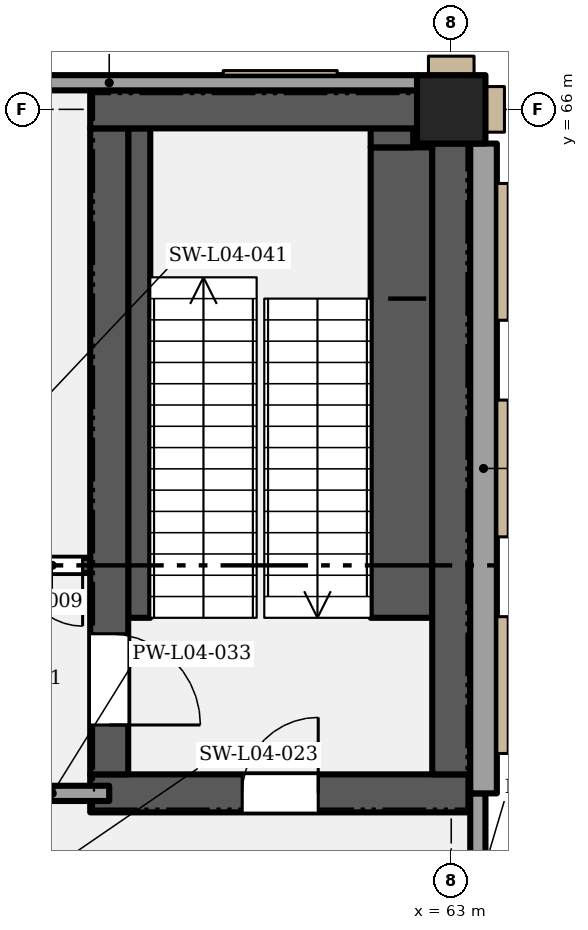
"""IFC4 building model, lengths in metres.
Left out: names, types, materials, properties, quantities, classifications, styles, units other than length and angle.
Written with IfcOpenShell. Run it as: python <this file> out.ifc"""

import sys

from ifc_helpers import new_model, si_unit, direction, frame, frame_2d, origin, origin_2d, place, context, subcontext, project, spatial, rectangle, extrude, element, fill, save


model = new_model("IFC4")
c1 = context("Model", 3, precision=1e-05, world=origin(), true_north=direction((0.0, 1.0)))
c2 = subcontext(c1, "Body", "Model", "MODEL_VIEW")
j1 = project(units=[si_unit("LENGTHUNIT", "METRE"), si_unit("PLANEANGLEUNIT", "RADIAN")], contexts=[c1])
p1 = place(None, origin())
s1 = spatial("IfcSite", under=j1, at=p1, CompositionType="ELEMENT")
p2 = place(p1, origin())
s2 = spatial("IfcBuilding", under=s1, at=p2, CompositionType="ELEMENT")
p3 = place(p2, frame((0.0, 0.0, 22.8)))
s3 = spatial("IfcBuildingStorey", under=s2, at=p3, CompositionType="ELEMENT", Elevation=22.8)
p4 = place(p3, frame((63.0, 66.0, 0.0), z_axis=(0.0, 0.0, 1.0), x_axis=(1.0, 0.0, 0.0)))
e1 = element("IfcColumn", 1, at=p4, inside=s3, PredefinedType="COLUMN", context=c2, shape_type="SweptSolid", body=[
    extrude(rectangle(XDim=0.9, YDim=0.9, at=origin_2d()), origin(), (0.0, 0.0, 1.0), 5.4),
])
p5 = place(p3, frame((58.25, 57.0, 0.0), z_axis=(0.0, 0.0, 1.0), x_axis=(1.0, 0.0, 0.0)))
e2 = element("IfcWall", 2, at=p5, inside=s3, PredefinedType="SHEAR", context=c2, shape_type="SweptSolid", body=[
    extrude(rectangle(XDim=5.0, YDim=0.5, at=frame_2d((2.5, 0.0))), origin(), (0.0, 0.0, 1.0), 5.15),
])
p6 = place(p5, frame((2.0, 0.0, 0.0)))
e3 = element("IfcOpeningElement", 3, at=p6, cuts=e2, PredefinedType="OPENING", context=c2, shape_type="SweptSolid", body=[
    extrude(rectangle(XDim=1.0, YDim=2.1, at=frame_2d((0.5, 1.05))), frame((0.0, 0.26, 0.0), z_axis=(0.0, -1.0, 0.0), x_axis=(1.0, 0.0, 0.0)), (0.0, 0.0, 1.0), 0.52),
])
p7 = place(p3, frame((58.5, 57.25, 0.0), z_axis=(0.0, 0.0, 1.0), x_axis=(0.0, 1.0, 0.0)))
e4 = element("IfcWall", 4, at=p7, inside=s3, PredefinedType="SHEAR", context=c2, shape_type="SweptSolid", body=[
    extrude(rectangle(XDim=8.5, YDim=0.5, at=frame_2d((4.25, 0.0))), origin(), (0.0, 0.0, 1.0), 5.15),
])
p8 = place(p7, frame((1.85, 0.0, 0.0), z_axis=(0.0, 0.0, 1.0), x_axis=(-1.0, 0.0, 0.0)))
e5 = element("IfcOpeningElement", 5, at=p8, cuts=e4, PredefinedType="OPENING", context=c2, shape_type="SweptSolid", body=[
    extrude(rectangle(XDim=1.2, YDim=2.1, at=frame_2d((0.6, 1.05))), frame((0.0, 0.26, 0.0), z_axis=(0.0, -1.0, 0.0), x_axis=(1.0, 0.0, 0.0)), (0.0, 0.0, 1.0), 0.52),
])
p9 = place(p3, frame((63.0, 57.25, 0.0), z_axis=(0.0, 0.0, 1.0), x_axis=(0.0, 1.0, 0.0)))
e6 = element("IfcWall", 6, at=p9, inside=s3, PredefinedType="SHEAR", context=c2, shape_type="SweptSolid", body=[
    extrude(rectangle(XDim=8.3, YDim=0.5, at=frame_2d((4.15, 0.0))), origin(), (0.0, 0.0, 1.0), 5.15),
])
p10 = place(p3, frame((58.25, 66.0, 0.0), z_axis=(0.0, 0.0, 1.0), x_axis=(1.0, 0.0, 0.0)))
e7 = element("IfcWall", 7, at=p10, inside=s3, PredefinedType="SHEAR", context=c2, shape_type="SweptSolid", body=[
    extrude(rectangle(XDim=4.3, YDim=0.5, at=frame_2d((2.15, 0.0))), origin(), (0.0, 0.0, 1.0), 5.15),
])
p11 = place(p3, frame((54.45, 66.35, 0.0), z_axis=(0.0, 0.0, 1.0), x_axis=(1.0, 0.0, 0.0)))
e8 = element("IfcWall", 8, at=p11, inside=s3, PredefinedType="SOLIDWALL", context=c2, shape_type="SweptSolid", body=[
    extrude(rectangle(XDim=8.1, YDim=0.2, at=frame_2d((4.05, 0.0))), origin(), (0.0, 0.0, 1.0), 5.15),
])
p12 = place(p3, frame((63.35, 54.45, 0.0), z_axis=(0.0, 0.0, 1.0), x_axis=(0.0, 1.0, 0.0)))
e9 = element("IfcWall", 9, at=p12, inside=s3, PredefinedType="SOLIDWALL", context=c2, shape_type="SweptSolid", body=[
    extrude(rectangle(XDim=2.55, YDim=0.2, at=frame_2d((1.275, 0.0))), origin(), (0.0, 0.0, 1.0), 5.15),
])
p13 = place(p12, frame((0.525, 0.0, 1.05)))
e10 = element("IfcOpeningElement", 10, at=p13, cuts=e9, PredefinedType="OPENING", context=c2, shape_type="SweptSolid", body=[
    extrude(rectangle(XDim=1.05, YDim=2.4, at=frame_2d((0.525, 1.2))), frame((0.0, 0.11, 0.0), z_axis=(0.0, -1.0, 0.0), x_axis=(1.0, 0.0, 0.0)), (0.0, 0.0, 1.0), 0.22),
])
p14 = place(p3, frame((63.425, 57.0, 0.0), z_axis=(0.0, 0.0, 1.0), x_axis=(0.0, 1.0, 0.0)))
e11 = element("IfcWall", 11, at=p14, inside=s3, PredefinedType="SOLIDWALL", context=c2, shape_type="SweptSolid", body=[
    extrude(rectangle(XDim=8.55, YDim=0.35, at=frame_2d((4.275, 0.0))), origin(), (0.0, 0.0, 1.0), 5.15),
])
p15 = place(p3, frame((57.0, 57.0, 0.0), z_axis=(0.0, 0.0, 1.0), x_axis=(1.0, 0.0, 0.0)))
e12 = element("IfcWall", 12, at=p15, inside=s3, PredefinedType="PARTITIONING", context=c2, shape_type="SweptSolid", body=[
    extrude(rectangle(XDim=1.5, YDim=0.2, at=frame_2d((0.75, 0.0))), origin(), (0.0, 0.0, 1.0), 5.15),
])
p16 = place(p3, frame((57.0, 60.0, 0.0), z_axis=(0.0, 0.0, 1.0), x_axis=(1.0, 0.0, 0.0)))
e13 = element("IfcWall", 13, at=p16, inside=s3, PredefinedType="SHEAR", context=c2, shape_type="SweptSolid", body=[
    extrude(rectangle(XDim=1.25, YDim=0.2, at=frame_2d((0.625, 0.0))), origin(), (0.0, 0.0, 1.0), 5.15),
])
p17 = place(p16, frame((1.15, 0.0, 0.0), z_axis=(0.0, 0.0, 1.0), x_axis=(-1.0, 0.0, 0.0)))
e14 = element("IfcOpeningElement", 14, at=p17, cuts=e13, PredefinedType="OPENING", context=c2, shape_type="SweptSolid", body=[
    extrude(rectangle(XDim=0.8, YDim=2.0, at=frame_2d((0.4, 1.0))), frame((0.0, 0.11, 0.0), z_axis=(0.0, -1.0, 0.0), x_axis=(1.0, 0.0, 0.0)), (0.0, 0.0, 1.0), 0.22),
])
p18 = place(p3, frame((58.895, 59.31, 0.0), z_axis=(0.0, 0.0, 1.0), x_axis=(0.0, 1.0, 0.0)))
e15 = element("IfcWall", 15, at=p18, inside=s3, PredefinedType="SHEAR", context=c2, shape_type="SweptSolid", body=[
    extrude(rectangle(XDim=6.44, YDim=0.29, at=frame_2d((3.22, 0.0))), origin(), (0.0, 0.0, 1.0), 2.587),
])
p19 = place(p3, frame((62.345, 59.31, 0.0), z_axis=(0.0, 0.0, 1.0), x_axis=(0.0, 1.0, 0.0)))
e16 = element("IfcWall", 16, at=p19, inside=s3, PredefinedType="SHEAR", context=c2, shape_type="SweptSolid", body=[
    extrude(rectangle(XDim=6.19, YDim=0.81, at=frame_2d((3.095, 0.0))), origin(), (0.0, 0.0, 1.0), 2.587),
])
p20 = place(p3, frame((62.22, 65.5, 0.0), z_axis=(0.0, 0.0, 1.0), x_axis=(0.0, 1.0, 0.0)))
e17 = element("IfcWall", 17, at=p20, inside=s3, PredefinedType="SHEAR", context=c2, shape_type="SweptSolid", body=[
    extrude(rectangle(XDim=0.25, YDim=0.56, at=frame_2d((0.125, 0.0))), origin(), (0.0, 0.0, 1.0), 2.587),
])
p21 = place(p8, origin())
e18 = element("IfcDoor", 18, at=p21, inside=s3, OperationType="SINGLE_SWING_RIGHT", PredefinedType="DOOR", context=c2, shape_type="SweptSolid", body=[
    extrude(rectangle(XDim=1.2, YDim=2.1, at=frame_2d((0.6, 1.05))), frame((0.0, 0.025, 0.0), z_axis=(0.0, -1.0, 0.0), x_axis=(1.0, 0.0, 0.0)), (0.0, 0.0, 1.0), 0.05),
])
fill(e5, e18)
p22 = place(p17, origin())
e19 = element("IfcDoor", 19, at=p22, inside=s3, OperationType="SINGLE_SWING_LEFT", PredefinedType="DOOR", context=c2, shape_type="SweptSolid", body=[
    extrude(rectangle(XDim=0.8, YDim=2.0, at=frame_2d((0.4, 1.0))), frame((0.0, 0.025, 0.0), z_axis=(0.0, -1.0, 0.0), x_axis=(1.0, 0.0, 0.0)), (0.0, 0.0, 1.0), 0.05),
])
fill(e14, e19)
p23 = place(p6, origin())
e20 = element("IfcDoor", 20, at=p23, inside=s3, OperationType="SINGLE_SWING_RIGHT", PredefinedType="DOOR", context=c2, shape_type="SweptSolid", body=[
    extrude(rectangle(XDim=1.0, YDim=2.1, at=frame_2d((0.5, 1.05))), frame((0.0, 0.025, 0.0), z_axis=(0.0, -1.0, 0.0), x_axis=(1.0, 0.0, 0.0)), (0.0, 0.0, 1.0), 0.05),
])
fill(e3, e20)
save(model, sys.argv[1])
